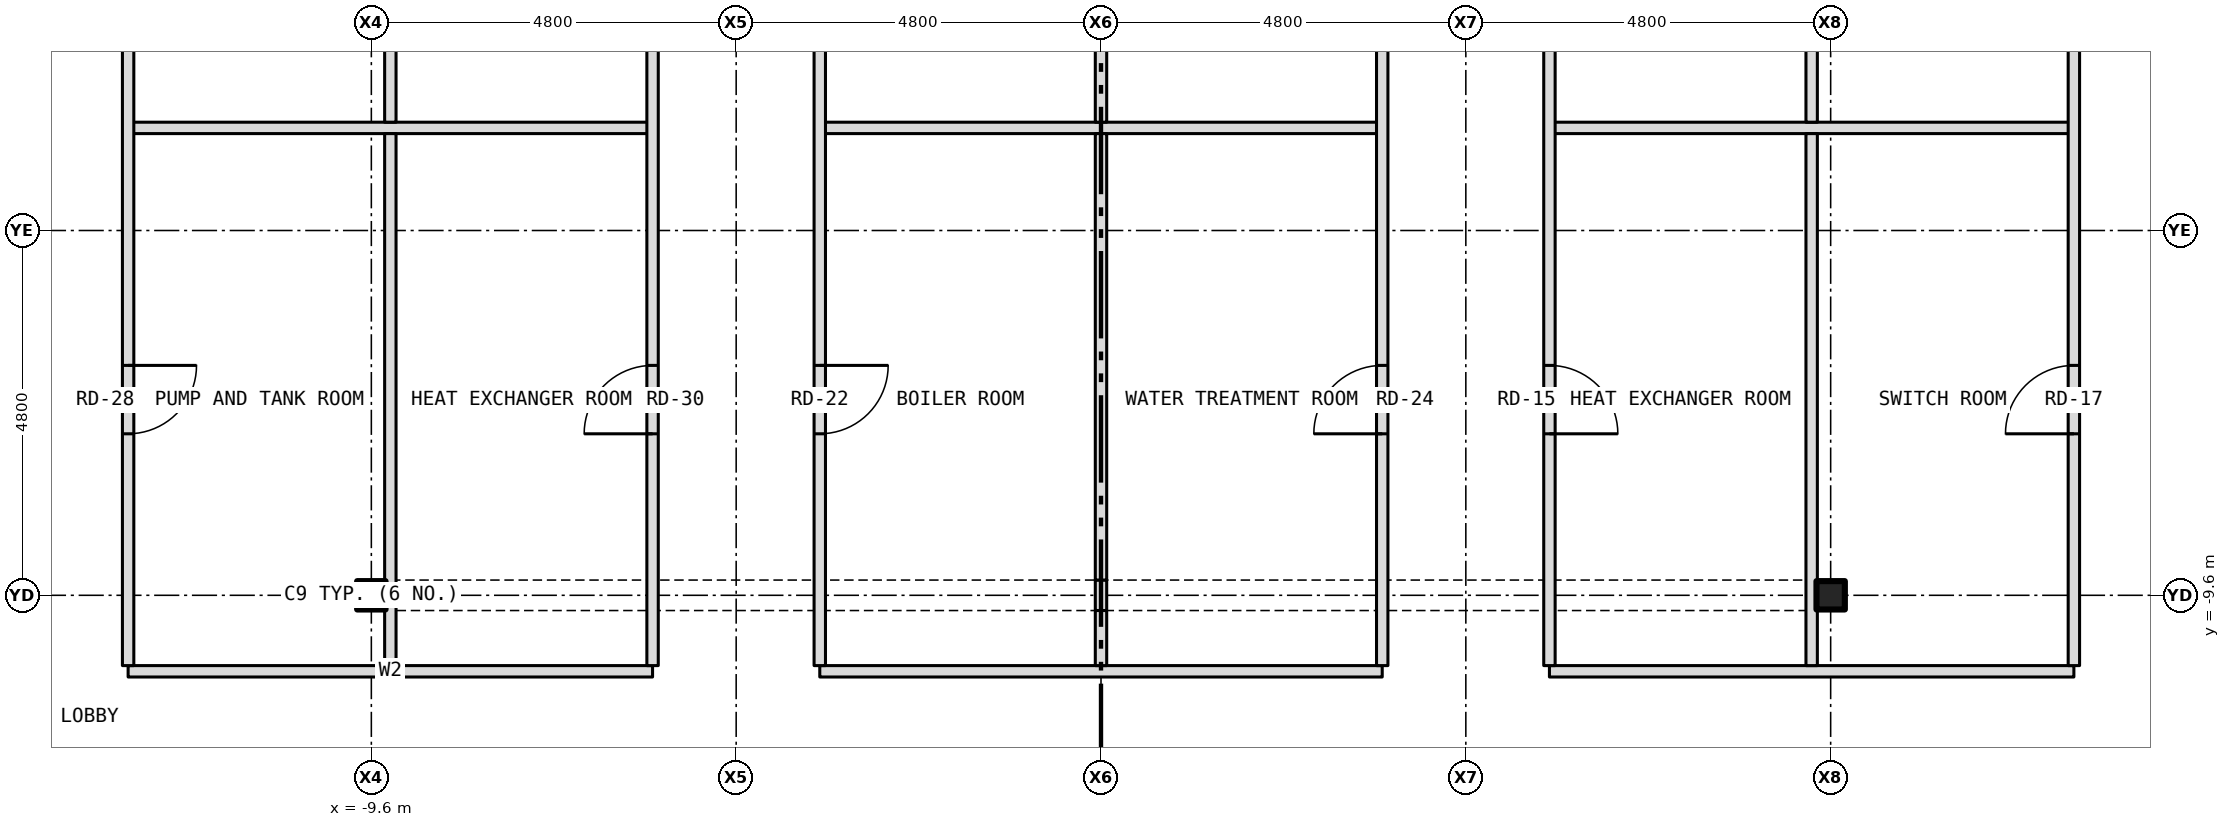
"""IFC4 building model, lengths in metres.
Left out: names, types, materials, properties, quantities, classifications, styles, units other than length and angle.
Written with IfcOpenShell. Run it as: python <this file> out.ifc"""

import sys

from ifc_helpers import new_model, si_unit, direction, frame, frame_2d, origin, origin_2d, place, context, subcontext, project, spatial, rectangle, i_section, extrude, element, fill, save


model = new_model("IFC4")
c1 = context("Model", 3, precision=1e-05, world=origin(), true_north=direction((0.0, 1.0)))
c2 = subcontext(c1, "Body", "Model", "MODEL_VIEW")
j1 = project(units=[si_unit("LENGTHUNIT", "METRE"), si_unit("PLANEANGLEUNIT", "RADIAN")], contexts=[c1])
p1 = place(None, origin())
s1 = spatial("IfcSite", under=j1, at=p1, CompositionType="ELEMENT")
p2 = place(p1, origin())
s2 = spatial("IfcBuilding", under=s1, at=p2, CompositionType="ELEMENT")
p3 = place(p2, frame((0.0, 0.0, 236.5)))
s3 = spatial("IfcBuildingStorey", under=s2, at=p3, CompositionType="ELEMENT", Elevation=236.5)
for number, where, z_axis, x_axis in (
    (1, (-9.6, -9.6, -0.3), (0.0, 0.0, 1.0), (1.0, 0.0, 0.0)),
    (2, (9.6, -9.6, -0.3), (0.0, 0.0, 1.0), (1.0, 0.0, 0.0)),
):
    element("IfcColumn", number, at=place(p3, frame(where, z_axis=z_axis, x_axis=x_axis)), inside=s3, PredefinedType="COLUMN", context=c2, shape_type="SweptSolid", body=[
        extrude(i_section(OverallWidth=0.373, OverallDepth=0.373, WebThickness=0.016, FlangeThickness=0.026, at=origin_2d()), origin(), (0.0, 0.0, 1.0), 4.65),
    ])
p4 = place(p3, frame((-12.8, -10.6, 0.0), z_axis=(0.0, 0.0, 1.0), x_axis=(1.0, 0.0, 0.0)))
e3 = element("IfcWall", 3, at=p4, inside=s3, PredefinedType="PARTITIONING", context=c2, shape_type="SweptSolid", body=[
    extrude(rectangle(XDim=6.9, YDim=0.15, at=frame_2d((3.45, 0.0))), origin(), (0.0, 0.0, 1.0), 4.35),
])
p5 = place(p3, frame((-3.7, -10.6, 0.0), z_axis=(0.0, 0.0, 1.0), x_axis=(1.0, 0.0, 0.0)))
e4 = element("IfcWall", 4, at=p5, inside=s3, PredefinedType="PARTITIONING", context=c2, shape_type="SweptSolid", body=[
    extrude(rectangle(XDim=7.4, YDim=0.15, at=frame_2d((3.7, 0.0))), origin(), (0.0, 0.0, 1.0), 4.35),
])
for number, where, z_axis, x_axis in (
    (5, (5.9, -10.6, 0.0), (0.0, 0.0, 1.0), (1.0, 0.0, 0.0)),
    (6, (-12.8, -3.45, 0.0), (0.0, 0.0, 1.0), (1.0, 0.0, 0.0)),
):
    element("IfcWall", number, at=place(p3, frame(where, z_axis=z_axis, x_axis=x_axis)), inside=s3, PredefinedType="PARTITIONING", context=c2, shape_type="SweptSolid", body=[
        extrude(rectangle(XDim=6.9, YDim=0.15, at=frame_2d((3.45, 0.0))), origin(), (0.0, 0.0, 1.0), 4.35),
    ])
p6 = place(p3, frame((-3.7, -3.45, 0.0), z_axis=(0.0, 0.0, 1.0), x_axis=(1.0, 0.0, 0.0)))
e7 = element("IfcWall", 7, at=p6, inside=s3, PredefinedType="PARTITIONING", context=c2, shape_type="SweptSolid", body=[
    extrude(rectangle(XDim=7.4, YDim=0.15, at=frame_2d((3.7, 0.0))), origin(), (0.0, 0.0, 1.0), 4.35),
])
p7 = place(p3, frame((5.9, -3.45, 0.0), z_axis=(0.0, 0.0, 1.0), x_axis=(1.0, 0.0, 0.0)))
e8 = element("IfcWall", 8, at=p7, inside=s3, PredefinedType="PARTITIONING", context=c2, shape_type="SweptSolid", body=[
    extrude(rectangle(XDim=6.9, YDim=0.15, at=frame_2d((3.45, 0.0))), origin(), (0.0, 0.0, 1.0), 4.35),
])
p8 = place(p3, frame((-12.8, -10.525, 0.0), z_axis=(0.0, 0.0, 1.0), x_axis=(0.0, 1.0, 0.0)))
e9 = element("IfcWall", 9, at=p8, inside=s3, PredefinedType="PARTITIONING", context=c2, shape_type="SweptSolid", body=[
    extrude(rectangle(XDim=8.525, YDim=0.15, at=frame_2d((4.262, 0.0))), origin(), (0.0, 0.0, 1.0), 4.35),
])
p9 = place(p8, frame((3.05, 0.0, 0.0)))
e10 = element("IfcOpeningElement", 10, at=p9, cuts=e9, PredefinedType="OPENING", context=c2, shape_type="SweptSolid", body=[
    extrude(rectangle(XDim=0.9, YDim=2.1, at=frame_2d((0.45, 1.05))), frame((0.0, 0.087, 0.0), z_axis=(0.0, -1.0, 0.0), x_axis=(1.0, 0.0, 0.0)), (0.0, 0.0, 1.0), 0.174),
])
for number, where, z_axis, x_axis in (
    (11, (-9.35, -10.525, 0.0), (0.0, 0.0, 1.0), (0.0, 1.0, 0.0)),
    (12, (-9.35, -3.375, 0.0), (0.0, 0.0, 1.0), (0.0, 1.0, 0.0)),
):
    element("IfcWall", number, at=place(p3, frame(where, z_axis=z_axis, x_axis=x_axis)), inside=s3, PredefinedType="PARTITIONING", context=c2, shape_type="SweptSolid", body=[
        extrude(rectangle(XDim=7.0, YDim=0.15, at=frame_2d((3.5, 0.0))), origin(), (0.0, 0.0, 1.0), 4.35),
    ])
p10 = place(p3, frame((-5.9, -10.525, 0.0), z_axis=(0.0, 0.0, 1.0), x_axis=(0.0, 1.0, 0.0)))
e13 = element("IfcWall", 13, at=p10, inside=s3, PredefinedType="PARTITIONING", context=c2, shape_type="SweptSolid", body=[
    extrude(rectangle(XDim=14.15, YDim=0.15, at=frame_2d((7.075, 0.0))), origin(), (0.0, 0.0, 1.0), 4.35),
])
p11 = place(p10, frame((3.05, 0.0, 0.0)))
e14 = element("IfcOpeningElement", 14, at=p11, cuts=e13, PredefinedType="OPENING", context=c2, shape_type="SweptSolid", body=[
    extrude(rectangle(XDim=0.9, YDim=2.1, at=frame_2d((0.45, 1.05))), frame((0.0, 0.087, 0.0), z_axis=(0.0, -1.0, 0.0), x_axis=(1.0, 0.0, 0.0)), (0.0, 0.0, 1.0), 0.174),
])
p12 = place(p10, frame((10.8, 0.0, 0.0)))
e15 = element("IfcOpeningElement", 15, at=p12, cuts=e13, PredefinedType="OPENING", context=c2, shape_type="SweptSolid", body=[
    extrude(rectangle(XDim=0.9, YDim=2.1, at=frame_2d((0.45, 1.05))), frame((0.0, 0.087, 0.0), z_axis=(0.0, -1.0, 0.0), x_axis=(1.0, 0.0, 0.0)), (0.0, 0.0, 1.0), 0.174),
])
p13 = place(p3, frame((-3.7, -10.525, 0.0), z_axis=(0.0, 0.0, 1.0), x_axis=(0.0, 1.0, 0.0)))
e16 = element("IfcWall", 16, at=p13, inside=s3, PredefinedType="PARTITIONING", context=c2, shape_type="SweptSolid", body=[
    extrude(rectangle(XDim=14.15, YDim=0.15, at=frame_2d((7.075, 0.0))), origin(), (0.0, 0.0, 1.0), 4.35),
])
p14 = place(p13, frame((3.05, 0.0, 0.0)))
e17 = element("IfcOpeningElement", 17, at=p14, cuts=e16, PredefinedType="OPENING", context=c2, shape_type="SweptSolid", body=[
    extrude(rectangle(XDim=0.9, YDim=2.1, at=frame_2d((0.45, 1.05))), frame((0.0, 0.087, 0.0), z_axis=(0.0, -1.0, 0.0), x_axis=(1.0, 0.0, 0.0)), (0.0, 0.0, 1.0), 0.174),
])
p15 = place(p13, frame((10.8, 0.0, 0.0)))
e18 = element("IfcOpeningElement", 18, at=p15, cuts=e16, PredefinedType="OPENING", context=c2, shape_type="SweptSolid", body=[
    extrude(rectangle(XDim=0.9, YDim=2.1, at=frame_2d((0.45, 1.05))), frame((0.0, 0.087, 0.0), z_axis=(0.0, -1.0, 0.0), x_axis=(1.0, 0.0, 0.0)), (0.0, 0.0, 1.0), 0.174),
])
p16 = place(p3, frame((0.0, -10.525, 0.0), z_axis=(0.0, 0.0, 1.0), x_axis=(0.0, 1.0, 0.0)))
e19 = element("IfcWall", 19, at=p16, inside=s3, PredefinedType="PARTITIONING", context=c2, shape_type="SweptSolid", body=[
    extrude(rectangle(XDim=0.725, YDim=0.15, at=frame_2d((0.362, 0.0))), origin(), (0.0, 0.0, 1.0), 3.728),
])
p17 = place(p3, frame((0.0, -9.8, 0.0), z_axis=(0.0, 0.0, 1.0), x_axis=(0.0, 1.0, 0.0)))
e20 = element("IfcWall", 20, at=p17, inside=s3, PredefinedType="PARTITIONING", context=c2, shape_type="SweptSolid", body=[
    extrude(rectangle(XDim=0.401, YDim=0.15, at=frame_2d((0.201, 0.0))), origin(), (0.0, 0.0, 1.0), 4.35),
])
p18 = place(p3, frame((0.0, -9.399, 0.0), z_axis=(0.0, 0.0, 1.0), x_axis=(0.0, 1.0, 0.0)))
e21 = element("IfcWall", 21, at=p18, inside=s3, PredefinedType="PARTITIONING", context=c2, shape_type="SweptSolid", body=[
    extrude(rectangle(XDim=5.874, YDim=0.15, at=frame_2d((2.937, 0.0))), origin(), (0.0, 0.0, 1.0), 3.728),
])
p19 = place(p3, frame((0.0, -3.375, 0.0), z_axis=(0.0, 0.0, 1.0), x_axis=(0.0, 1.0, 0.0)))
e22 = element("IfcWall", 22, at=p19, inside=s3, PredefinedType="PARTITIONING", context=c2, shape_type="SweptSolid", body=[
    extrude(rectangle(XDim=3.174, YDim=0.15, at=frame_2d((1.587, 0.0))), origin(), (0.0, 0.0, 1.0), 3.728),
])
p20 = place(p3, frame((3.7, -10.525, 0.0), z_axis=(0.0, 0.0, 1.0), x_axis=(0.0, 1.0, 0.0)))
e23 = element("IfcWall", 23, at=p20, inside=s3, PredefinedType="PARTITIONING", context=c2, shape_type="SweptSolid", body=[
    extrude(rectangle(XDim=14.15, YDim=0.15, at=frame_2d((7.075, 0.0))), origin(), (0.0, 0.0, 1.0), 4.35),
])
p21 = place(p20, frame((3.05, 0.0, 0.0)))
e24 = element("IfcOpeningElement", 24, at=p21, cuts=e23, PredefinedType="OPENING", context=c2, shape_type="SweptSolid", body=[
    extrude(rectangle(XDim=0.9, YDim=2.1, at=frame_2d((0.45, 1.05))), frame((0.0, 0.087, 0.0), z_axis=(0.0, -1.0, 0.0), x_axis=(1.0, 0.0, 0.0)), (0.0, 0.0, 1.0), 0.174),
])
p22 = place(p20, frame((10.8, 0.0, 0.0)))
e25 = element("IfcOpeningElement", 25, at=p22, cuts=e23, PredefinedType="OPENING", context=c2, shape_type="SweptSolid", body=[
    extrude(rectangle(XDim=0.9, YDim=2.1, at=frame_2d((0.45, 1.05))), frame((0.0, 0.087, 0.0), z_axis=(0.0, -1.0, 0.0), x_axis=(1.0, 0.0, 0.0)), (0.0, 0.0, 1.0), 0.174),
])
p23 = place(p3, frame((5.9, -10.525, 0.0), z_axis=(0.0, 0.0, 1.0), x_axis=(0.0, 1.0, 0.0)))
e26 = element("IfcWall", 26, at=p23, inside=s3, PredefinedType="PARTITIONING", context=c2, shape_type="SweptSolid", body=[
    extrude(rectangle(XDim=14.15, YDim=0.15, at=frame_2d((7.075, 0.0))), origin(), (0.0, 0.0, 1.0), 4.35),
])
p24 = place(p23, frame((3.05, 0.0, 0.0)))
e27 = element("IfcOpeningElement", 27, at=p24, cuts=e26, PredefinedType="OPENING", context=c2, shape_type="SweptSolid", body=[
    extrude(rectangle(XDim=0.9, YDim=2.1, at=frame_2d((0.45, 1.05))), frame((0.0, 0.087, 0.0), z_axis=(0.0, -1.0, 0.0), x_axis=(1.0, 0.0, 0.0)), (0.0, 0.0, 1.0), 0.174),
])
p25 = place(p23, frame((10.8, 0.0, 0.0)))
e28 = element("IfcOpeningElement", 28, at=p25, cuts=e26, PredefinedType="OPENING", context=c2, shape_type="SweptSolid", body=[
    extrude(rectangle(XDim=0.9, YDim=2.1, at=frame_2d((0.45, 1.05))), frame((0.0, 0.087, 0.0), z_axis=(0.0, -1.0, 0.0), x_axis=(1.0, 0.0, 0.0)), (0.0, 0.0, 1.0), 0.174),
])
for number, where, z_axis, x_axis in (
    (29, (9.35, -10.525, 0.0), (0.0, 0.0, 1.0), (0.0, 1.0, 0.0)),
    (30, (9.35, -3.375, 0.0), (0.0, 0.0, 1.0), (0.0, 1.0, 0.0)),
):
    element("IfcWall", number, at=place(p3, frame(where, z_axis=z_axis, x_axis=x_axis)), inside=s3, PredefinedType="PARTITIONING", context=c2, shape_type="SweptSolid", body=[
        extrude(rectangle(XDim=7.0, YDim=0.15, at=frame_2d((3.5, 0.0))), origin(), (0.0, 0.0, 1.0), 4.35),
    ])
p26 = place(p3, frame((12.8, -10.525, 0.0), z_axis=(0.0, 0.0, 1.0), x_axis=(0.0, 1.0, 0.0)))
e31 = element("IfcWall", 31, at=p26, inside=s3, PredefinedType="PARTITIONING", context=c2, shape_type="SweptSolid", body=[
    extrude(rectangle(XDim=8.525, YDim=0.15, at=frame_2d((4.262, 0.0))), origin(), (0.0, 0.0, 1.0), 4.35),
])
p27 = place(p26, frame((3.05, 0.0, 0.0)))
e32 = element("IfcOpeningElement", 32, at=p27, cuts=e31, PredefinedType="OPENING", context=c2, shape_type="SweptSolid", body=[
    extrude(rectangle(XDim=0.9, YDim=2.1, at=frame_2d((0.45, 1.05))), frame((0.0, 0.087, 0.0), z_axis=(0.0, -1.0, 0.0), x_axis=(1.0, 0.0, 0.0)), (0.0, 0.0, 1.0), 0.174),
])
p28 = place(p24, origin())
e33 = element("IfcDoor", 33, at=p28, inside=s3, OperationType="SINGLE_SWING_LEFT", PredefinedType="DOOR", context=c2, shape_type="SweptSolid", body=[
    extrude(rectangle(XDim=0.9, YDim=2.1, at=frame_2d((0.45, 1.05))), frame((0.0, 0.025, 0.0), z_axis=(0.0, -1.0, 0.0), x_axis=(1.0, 0.0, 0.0)), (0.0, 0.0, 1.0), 0.05),
])
fill(e27, e33)
p29 = place(p27, origin())
e34 = element("IfcDoor", 34, at=p29, inside=s3, OperationType="SINGLE_SWING_LEFT", PredefinedType="DOOR", context=c2, shape_type="SweptSolid", body=[
    extrude(rectangle(XDim=0.9, YDim=2.1, at=frame_2d((0.45, 1.05))), frame((0.0, 0.025, 0.0), z_axis=(0.0, -1.0, 0.0), x_axis=(1.0, 0.0, 0.0)), (0.0, 0.0, 1.0), 0.05),
])
fill(e32, e34)
p30 = place(p14, origin())
e35 = element("IfcDoor", 35, at=p30, inside=s3, OperationType="SINGLE_SWING_RIGHT", PredefinedType="DOOR", context=c2, shape_type="SweptSolid", body=[
    extrude(rectangle(XDim=0.9, YDim=2.1, at=frame_2d((0.45, 1.05))), frame((0.0, 0.025, 0.0), z_axis=(0.0, -1.0, 0.0), x_axis=(1.0, 0.0, 0.0)), (0.0, 0.0, 1.0), 0.05),
])
fill(e17, e35)
p31 = place(p21, origin())
e36 = element("IfcDoor", 36, at=p31, inside=s3, OperationType="SINGLE_SWING_LEFT", PredefinedType="DOOR", context=c2, shape_type="SweptSolid", body=[
    extrude(rectangle(XDim=0.9, YDim=2.1, at=frame_2d((0.45, 1.05))), frame((0.0, 0.025, 0.0), z_axis=(0.0, -1.0, 0.0), x_axis=(1.0, 0.0, 0.0)), (0.0, 0.0, 1.0), 0.05),
])
fill(e24, e36)
p32 = place(p9, origin())
e37 = element("IfcDoor", 37, at=p32, inside=s3, OperationType="SINGLE_SWING_RIGHT", PredefinedType="DOOR", context=c2, shape_type="SweptSolid", body=[
    extrude(rectangle(XDim=0.9, YDim=2.1, at=frame_2d((0.45, 1.05))), frame((0.0, 0.025, 0.0), z_axis=(0.0, -1.0, 0.0), x_axis=(1.0, 0.0, 0.0)), (0.0, 0.0, 1.0), 0.05),
])
fill(e10, e37)
p33 = place(p11, origin())
e38 = element("IfcDoor", 38, at=p33, inside=s3, OperationType="SINGLE_SWING_LEFT", PredefinedType="DOOR", context=c2, shape_type="SweptSolid", body=[
    extrude(rectangle(XDim=0.9, YDim=2.1, at=frame_2d((0.45, 1.05))), frame((0.0, 0.025, 0.0), z_axis=(0.0, -1.0, 0.0), x_axis=(1.0, 0.0, 0.0)), (0.0, 0.0, 1.0), 0.05),
])
fill(e14, e38)
save(model, sys.argv[1])
